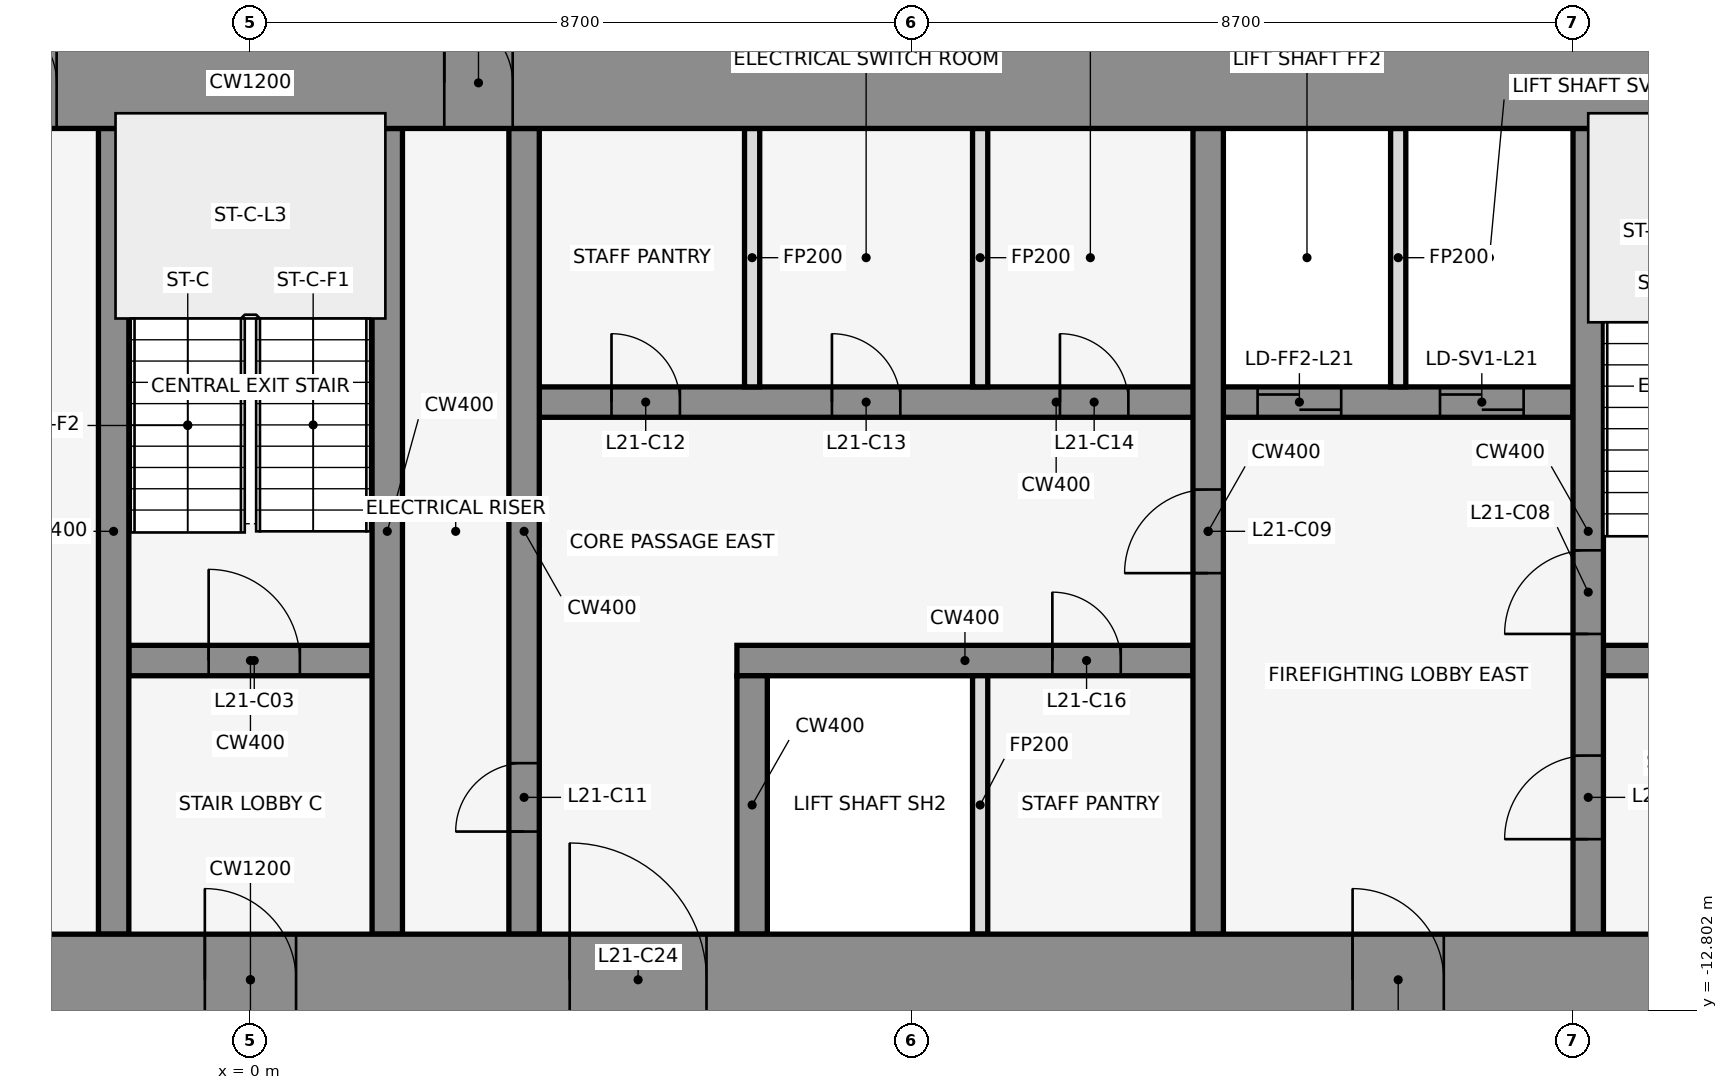
"""IFC4 building model, lengths in metres.
Left out: names, types, materials, properties, quantities, classifications, styles, units other than length and angle.
Written with IfcOpenShell. Run it as: python <this file> out.ifc"""

import sys

from ifc_helpers import new_model, si_unit, direction, frame, frame_2d, origin, place, context, subcontext, project, spatial, rectangle, extrude, element, fill, save


model = new_model("IFC4")
c1 = context("Model", 3, precision=1e-05, world=origin(), true_north=direction((0.0, 1.0)))
c2 = subcontext(c1, "Body", "Model", "MODEL_VIEW")
j1 = project(units=[si_unit("LENGTHUNIT", "METRE"), si_unit("PLANEANGLEUNIT", "RADIAN")], contexts=[c1])
p1 = place(None, origin())
s1 = spatial("IfcSite", under=j1, at=p1, CompositionType="ELEMENT")
p2 = place(p1, origin())
s2 = spatial("IfcBuilding", under=s1, at=p2, CompositionType="ELEMENT")
p3 = place(p2, frame((0.0, 0.0, 102.2)))
s3 = spatial("IfcBuildingStorey", under=s2, at=p3, CompositionType="ELEMENT", Elevation=102.2)
for number, where, z_axis, x_axis in (
    (1, (16.432, -0.105, 0.0), (0.0, 0.0, 1.0), (-0.84, 0.543, 0.0)),
    (2, (1.901, 1.08, 0.0), (0.0, 0.0, 1.0), (-0.84, -0.543, 0.0)),
    (3, (-0.068, -0.105, 0.0), (0.0, 0.0, 1.0), (-0.84, 0.543, 0.0)),
):
    element("IfcWall", number, at=place(p3, frame(where, z_axis=z_axis, x_axis=x_axis)), inside=s3, PredefinedType="STANDARD", context=c2, shape_type="SweptSolid", body=[
        extrude(rectangle(XDim=2.183, YDim=0.25, at=frame_2d((1.091, 0.0))), origin(), (0.0, 0.0, 1.0), 3.95),
    ])
p4 = place(p3, frame((-1.6, -8.2, 0.0), z_axis=(0.0, 0.0, 1.0), x_axis=(1.0, 0.0, 0.0)))
e4 = element("IfcWall", 4, at=p4, inside=s3, PredefinedType="SHEAR", context=c2, shape_type="SweptSolid", body=[
    extrude(rectangle(XDim=3.2, YDim=0.4, at=frame_2d((1.6, 0.0))), origin(), (0.0, 0.0, 1.0), 4.1),
])
p5 = place(p4, frame((1.05, 0.0, 0.0)))
e5 = element("IfcOpeningElement", 5, at=p5, cuts=e4, PredefinedType="OPENING", context=c2, shape_type="SweptSolid", body=[
    extrude(rectangle(XDim=1.2, YDim=2.1, at=frame_2d((0.6, 1.05))), frame((0.0, 0.212, 0.0), z_axis=(0.0, -1.0, 0.0), x_axis=(1.0, 0.0, 0.0)), (0.0, 0.0, 1.0), 0.424),
])
p6 = place(p3, frame((6.4, -8.2, 0.0), z_axis=(0.0, 0.0, 1.0), x_axis=(1.0, 0.0, 0.0)))
e6 = element("IfcWall", 6, at=p6, inside=s3, PredefinedType="SHEAR", context=c2, shape_type="SweptSolid", body=[
    extrude(rectangle(XDim=6.0, YDim=0.4, at=frame_2d((3.0, 0.0))), origin(), (0.0, 0.0, 1.0), 4.1),
])
p7 = place(p6, frame((4.15, 0.0, 0.0)))
e7 = element("IfcOpeningElement", 7, at=p7, cuts=e6, PredefinedType="OPENING", context=c2, shape_type="SweptSolid", body=[
    extrude(rectangle(XDim=0.9, YDim=2.1, at=frame_2d((0.45, 1.05))), frame((0.0, 0.212, 0.0), z_axis=(0.0, -1.0, 0.0), x_axis=(1.0, 0.0, 0.0)), (0.0, 0.0, 1.0), 0.424),
])
p8 = place(p3, frame((17.8, -8.2, 0.0), z_axis=(0.0, 0.0, 1.0), x_axis=(1.0, 0.0, 0.0)))
e8 = element("IfcWall", 8, at=p8, inside=s3, PredefinedType="SHEAR", context=c2, shape_type="SweptSolid", body=[
    extrude(rectangle(XDim=3.0, YDim=0.4, at=frame_2d((1.5, 0.0))), origin(), (0.0, 0.0, 1.0), 4.1),
])
p9 = place(p8, frame((0.85, 0.0, 0.0)))
e9 = element("IfcOpeningElement", 9, at=p9, cuts=e8, PredefinedType="OPENING", context=c2, shape_type="SweptSolid", body=[
    extrude(rectangle(XDim=1.2, YDim=2.1, at=frame_2d((0.6, 1.05))), frame((0.0, 0.212, 0.0), z_axis=(0.0, -1.0, 0.0), x_axis=(1.0, 0.0, 0.0)), (0.0, 0.0, 1.0), 0.424),
])
p10 = place(p3, frame((3.8, -4.8, 0.0), z_axis=(0.0, 0.0, 1.0), x_axis=(1.0, 0.0, 0.0)))
e10 = element("IfcWall", 10, at=p10, inside=s3, PredefinedType="SHEAR", context=c2, shape_type="SweptSolid", body=[
    extrude(rectangle(XDim=13.6, YDim=0.4, at=frame_2d((6.8, 0.0))), origin(), (0.0, 0.0, 1.0), 4.1),
])
p11 = place(p10, frame((9.45, 0.0, 0.0)))
e11 = element("IfcOpeningElement", 11, at=p11, cuts=e10, PredefinedType="OPENING", context=c2, shape_type="SweptSolid", body=[
    extrude(rectangle(XDim=1.1, YDim=2.1, at=frame_2d((0.55, 1.05))), frame((0.0, 0.212, 0.0), z_axis=(0.0, -1.0, 0.0), x_axis=(1.0, 0.0, 0.0)), (0.0, 0.0, 1.0), 0.424),
])
p12 = place(p10, frame((11.85, 0.0, 0.0)))
e12 = element("IfcOpeningElement", 12, at=p12, cuts=e10, PredefinedType="OPENING", context=c2, shape_type="SweptSolid", body=[
    extrude(rectangle(XDim=1.1, YDim=2.1, at=frame_2d((0.55, 1.05))), frame((0.0, 0.212, 0.0), z_axis=(0.0, -1.0, 0.0), x_axis=(1.0, 0.0, 0.0)), (0.0, 0.0, 1.0), 0.424),
])
p13 = place(p10, frame((0.95, 0.0, 0.0)))
e13 = element("IfcOpeningElement", 13, at=p13, cuts=e10, PredefinedType="OPENING", context=c2, shape_type="SweptSolid", body=[
    extrude(rectangle(XDim=0.9, YDim=2.1, at=frame_2d((0.45, 1.05))), frame((0.0, 0.212, 0.0), z_axis=(0.0, -1.0, 0.0), x_axis=(1.0, 0.0, 0.0)), (0.0, 0.0, 1.0), 0.424),
])
p14 = place(p10, frame((3.85, 0.0, 0.0)))
e14 = element("IfcOpeningElement", 14, at=p14, cuts=e10, PredefinedType="OPENING", context=c2, shape_type="SweptSolid", body=[
    extrude(rectangle(XDim=0.9, YDim=2.1, at=frame_2d((0.45, 1.05))), frame((0.0, 0.212, 0.0), z_axis=(0.0, -1.0, 0.0), x_axis=(1.0, 0.0, 0.0)), (0.0, 0.0, 1.0), 0.424),
])
p15 = place(p10, frame((6.85, 0.0, 0.0)))
e15 = element("IfcOpeningElement", 15, at=p15, cuts=e10, PredefinedType="OPENING", context=c2, shape_type="SweptSolid", body=[
    extrude(rectangle(XDim=0.9, YDim=2.1, at=frame_2d((0.45, 1.05))), frame((0.0, 0.212, 0.0), z_axis=(0.0, -1.0, 0.0), x_axis=(1.0, 0.0, 0.0)), (0.0, 0.0, 1.0), 0.424),
])
for number, where, z_axis, x_axis in (
    (16, (-1.8, -11.8, 0.0), (0.0, 0.0, 1.0), (0.0, 1.0, 0.0)),
    (17, (1.8, -11.8, 0.0), (0.0, 0.0, 1.0), (0.0, 1.0, 0.0)),
):
    element("IfcWall", number, at=place(p3, frame(where, z_axis=z_axis, x_axis=x_axis)), inside=s3, PredefinedType="SHEAR", context=c2, shape_type="SweptSolid", body=[
        extrude(rectangle(XDim=10.6, YDim=0.4, at=frame_2d((5.3, 0.0))), origin(), (0.0, 0.0, 1.0), 4.1),
    ])
p16 = place(p3, frame((3.6, -11.8, 0.0), z_axis=(0.0, 0.0, 1.0), x_axis=(0.0, 1.0, 0.0)))
e18 = element("IfcWall", 18, at=p16, inside=s3, PredefinedType="SHEAR", context=c2, shape_type="SweptSolid", body=[
    extrude(rectangle(XDim=10.6, YDim=0.4, at=frame_2d((5.3, 0.0))), origin(), (0.0, 0.0, 1.0), 4.1),
])
p17 = place(p16, frame((1.35, 0.0, 0.0)))
e19 = element("IfcOpeningElement", 19, at=p17, cuts=e18, PredefinedType="OPENING", context=c2, shape_type="SweptSolid", body=[
    extrude(rectangle(XDim=0.9, YDim=2.1, at=frame_2d((0.45, 1.05))), frame((0.0, 0.212, 0.0), z_axis=(0.0, -1.0, 0.0), x_axis=(1.0, 0.0, 0.0)), (0.0, 0.0, 1.0), 0.424),
])
p18 = place(p3, frame((6.6, -11.8, 0.0), z_axis=(0.0, 0.0, 1.0), x_axis=(0.0, 1.0, 0.0)))
e20 = element("IfcWall", 20, at=p18, inside=s3, PredefinedType="SHEAR", context=c2, shape_type="SweptSolid", body=[
    extrude(rectangle(XDim=3.4, YDim=0.4, at=frame_2d((1.7, 0.0))), origin(), (0.0, 0.0, 1.0), 4.1),
])
for number, where, z_axis, x_axis in (
    (21, (6.6, -4.6, 0.0), (0.0, 0.0, 1.0), (0.0, 1.0, 0.0)),
    (22, (9.6, -11.8, 0.0), (0.0, 0.0, 1.0), (0.0, 1.0, 0.0)),
    (23, (9.6, -4.6, 0.0), (0.0, 0.0, 1.0), (0.0, 1.0, 0.0)),
):
    element("IfcWall", number, at=place(p3, frame(where, z_axis=z_axis, x_axis=x_axis)), inside=s3, PredefinedType="PARTITIONING", context=c2, shape_type="SweptSolid", body=[
        extrude(rectangle(XDim=3.4, YDim=0.2, at=frame_2d((1.7, 0.0))), origin(), (0.0, 0.0, 1.0), 3.018),
    ])
p19 = place(p3, frame((12.6, -11.8, 0.0), z_axis=(0.0, 0.0, 1.0), x_axis=(0.0, 1.0, 0.0)))
e24 = element("IfcWall", 24, at=p19, inside=s3, PredefinedType="SHEAR", context=c2, shape_type="SweptSolid", body=[
    extrude(rectangle(XDim=10.6, YDim=0.4, at=frame_2d((5.3, 0.0))), origin(), (0.0, 0.0, 1.0), 4.1),
])
p20 = place(p19, frame((4.75, 0.0, 0.0)))
e25 = element("IfcOpeningElement", 25, at=p20, cuts=e24, PredefinedType="OPENING", context=c2, shape_type="SweptSolid", body=[
    extrude(rectangle(XDim=1.1, YDim=2.1, at=frame_2d((0.55, 1.05))), frame((0.0, 0.212, 0.0), z_axis=(0.0, -1.0, 0.0), x_axis=(1.0, 0.0, 0.0)), (0.0, 0.0, 1.0), 0.424),
])
p21 = place(p3, frame((15.1, -4.6, 0.0), z_axis=(0.0, 0.0, 1.0), x_axis=(0.0, 1.0, 0.0)))
e26 = element("IfcWall", 26, at=p21, inside=s3, PredefinedType="PARTITIONING", context=c2, shape_type="SweptSolid", body=[
    extrude(rectangle(XDim=3.4, YDim=0.2, at=frame_2d((1.7, 0.0))), origin(), (0.0, 0.0, 1.0), 3.018),
])
p22 = place(p3, frame((17.6, -11.8, 0.0), z_axis=(0.0, 0.0, 1.0), x_axis=(0.0, 1.0, 0.0)))
e27 = element("IfcWall", 27, at=p22, inside=s3, PredefinedType="SHEAR", context=c2, shape_type="SweptSolid", body=[
    extrude(rectangle(XDim=10.6, YDim=0.4, at=frame_2d((5.3, 0.0))), origin(), (0.0, 0.0, 1.0), 4.1),
])
p23 = place(p22, frame((1.25, 0.0, 0.0)))
e28 = element("IfcOpeningElement", 28, at=p23, cuts=e27, PredefinedType="OPENING", context=c2, shape_type="SweptSolid", body=[
    extrude(rectangle(XDim=1.1, YDim=2.1, at=frame_2d((0.55, 1.05))), frame((0.0, 0.212, 0.0), z_axis=(0.0, -1.0, 0.0), x_axis=(1.0, 0.0, 0.0)), (0.0, 0.0, 1.0), 0.424),
])
p24 = place(p22, frame((3.95, 0.0, 0.0)))
e29 = element("IfcOpeningElement", 29, at=p24, cuts=e27, PredefinedType="OPENING", context=c2, shape_type="SweptSolid", body=[
    extrude(rectangle(XDim=1.1, YDim=2.1, at=frame_2d((0.55, 1.05))), frame((0.0, 0.212, 0.0), z_axis=(0.0, -1.0, 0.0), x_axis=(1.0, 0.0, 0.0)), (0.0, 0.0, 1.0), 0.424),
])
p25 = place(p3, frame((-22.0, -0.6, 0.0), z_axis=(0.0, 0.0, 1.0), x_axis=(1.0, 0.0, 0.0)))
e30 = element("IfcWall", 30, at=p25, inside=s3, PredefinedType="SHEAR", context=c2, shape_type="SweptSolid", body=[
    extrude(rectangle(XDim=44.0, YDim=1.2, at=frame_2d((22.0, 0.0))), origin(), (0.0, 0.0, 1.0), 4.1),
])
p26 = place(p25, frame((18.55, 0.0, 0.0)))
e31 = element("IfcOpeningElement", 31, at=p26, cuts=e30, PredefinedType="OPENING", context=c2, shape_type="SweptSolid", body=[
    extrude(rectangle(XDim=0.9, YDim=2.1, at=frame_2d((0.45, 1.05))), frame((0.0, 0.612, 0.0), z_axis=(0.0, -1.0, 0.0), x_axis=(1.0, 0.0, 0.0)), (0.0, 0.0, 1.0), 1.224),
])
p27 = place(p25, frame((24.55, 0.0, 0.0)))
e32 = element("IfcOpeningElement", 32, at=p27, cuts=e30, PredefinedType="OPENING", context=c2, shape_type="SweptSolid", body=[
    extrude(rectangle(XDim=0.9, YDim=2.1, at=frame_2d((0.45, 1.05))), frame((0.0, 0.612, 0.0), z_axis=(0.0, -1.0, 0.0), x_axis=(1.0, 0.0, 0.0)), (0.0, 0.0, 1.0), 1.224),
])
p28 = place(p3, frame((-22.0, -12.4, 0.0), z_axis=(0.0, 0.0, 1.0), x_axis=(1.0, 0.0, 0.0)))
e33 = element("IfcWall", 33, at=p28, inside=s3, PredefinedType="SHEAR", context=c2, shape_type="SweptSolid", body=[
    extrude(rectangle(XDim=44.0, YDim=1.2, at=frame_2d((22.0, 0.0))), origin(), (0.0, 0.0, 1.0), 4.1),
])
p29 = place(p28, frame((2.2, 0.0, 0.0)))
e34 = element("IfcOpeningElement", 34, at=p29, cuts=e33, PredefinedType="OPENING", context=c2, shape_type="SweptSolid", body=[
    extrude(rectangle(XDim=1.2, YDim=2.1, at=frame_2d((0.6, 1.05))), frame((0.0, 0.612, 0.0), z_axis=(0.0, -1.0, 0.0), x_axis=(1.0, 0.0, 0.0)), (0.0, 0.0, 1.0), 1.224),
])
p30 = place(p28, frame((21.4, 0.0, 0.0)))
e35 = element("IfcOpeningElement", 35, at=p30, cuts=e33, PredefinedType="OPENING", context=c2, shape_type="SweptSolid", body=[
    extrude(rectangle(XDim=1.2, YDim=2.1, at=frame_2d((0.6, 1.05))), frame((0.0, 0.612, 0.0), z_axis=(0.0, -1.0, 0.0), x_axis=(1.0, 0.0, 0.0)), (0.0, 0.0, 1.0), 1.224),
])
p31 = place(p28, frame((40.6, 0.0, 0.0)))
e36 = element("IfcOpeningElement", 36, at=p31, cuts=e33, PredefinedType="OPENING", context=c2, shape_type="SweptSolid", body=[
    extrude(rectangle(XDim=1.2, YDim=2.1, at=frame_2d((0.6, 1.05))), frame((0.0, 0.612, 0.0), z_axis=(0.0, -1.0, 0.0), x_axis=(1.0, 0.0, 0.0)), (0.0, 0.0, 1.0), 1.224),
])
p32 = place(p28, frame((16.0, 0.0, 0.0)))
e37 = element("IfcOpeningElement", 37, at=p32, cuts=e33, PredefinedType="OPENING", context=c2, shape_type="SweptSolid", body=[
    extrude(rectangle(XDim=1.8, YDim=2.1, at=frame_2d((0.9, 1.05))), frame((0.0, 0.612, 0.0), z_axis=(0.0, -1.0, 0.0), x_axis=(1.0, 0.0, 0.0)), (0.0, 0.0, 1.0), 1.224),
])
p33 = place(p28, frame((6.3, 0.0, 0.0)))
e38 = element("IfcOpeningElement", 38, at=p33, cuts=e33, PredefinedType="OPENING", context=c2, shape_type="SweptSolid", body=[
    extrude(rectangle(XDim=1.2, YDim=2.1, at=frame_2d((0.6, 1.05))), frame((0.0, 0.612, 0.0), z_axis=(0.0, -1.0, 0.0), x_axis=(1.0, 0.0, 0.0)), (0.0, 0.0, 1.0), 1.224),
])
p34 = place(p28, frame((26.2, 0.0, 0.0)))
e39 = element("IfcOpeningElement", 39, at=p34, cuts=e33, PredefinedType="OPENING", context=c2, shape_type="SweptSolid", body=[
    extrude(rectangle(XDim=1.8, YDim=2.1, at=frame_2d((0.9, 1.05))), frame((0.0, 0.612, 0.0), z_axis=(0.0, -1.0, 0.0), x_axis=(1.0, 0.0, 0.0)), (0.0, 0.0, 1.0), 1.224),
])
p35 = place(p28, frame((36.5, 0.0, 0.0)))
e40 = element("IfcOpeningElement", 40, at=p35, cuts=e33, PredefinedType="OPENING", context=c2, shape_type="SweptSolid", body=[
    extrude(rectangle(XDim=1.2, YDim=2.1, at=frame_2d((0.6, 1.05))), frame((0.0, 0.612, 0.0), z_axis=(0.0, -1.0, 0.0), x_axis=(1.0, 0.0, 0.0)), (0.0, 0.0, 1.0), 1.224),
])
p36 = place(p5, origin())
e41 = element("IfcDoor", 41, at=p36, inside=s3, OperationType="SINGLE_SWING_LEFT", PredefinedType="DOOR", context=c2, shape_type="SweptSolid", body=[
    extrude(rectangle(XDim=1.2, YDim=2.1, at=frame_2d((0.6, 1.05))), frame((0.0, 0.025, 0.0), z_axis=(0.0, -1.0, 0.0), x_axis=(1.0, 0.0, 0.0)), (0.0, 0.0, 1.0), 0.05),
])
fill(e5, e41)
p37 = place(p23, origin())
e42 = element("IfcDoor", 42, at=p37, inside=s3, OperationType="SINGLE_SWING_LEFT", PredefinedType="DOOR", context=c2, shape_type="SweptSolid", body=[
    extrude(rectangle(XDim=1.1, YDim=2.1, at=frame_2d((0.55, 1.05))), frame((0.0, 0.025, 0.0), z_axis=(0.0, -1.0, 0.0), x_axis=(1.0, 0.0, 0.0)), (0.0, 0.0, 1.0), 0.05),
])
fill(e28, e42)
p38 = place(p11, origin())
e43 = element("IfcDoor", 43, at=p38, inside=s3, OperationType="DOUBLE_DOOR_SLIDING", PredefinedType="DOOR", context=c2, shape_type="SweptSolid", body=[
    extrude(rectangle(XDim=1.1, YDim=2.1, at=frame_2d((0.55, 1.05))), frame((0.0, 0.025, 0.0), z_axis=(0.0, -1.0, 0.0), x_axis=(1.0, 0.0, 0.0)), (0.0, 0.0, 1.0), 0.05),
])
fill(e11, e43)
p39 = place(p12, origin())
e44 = element("IfcDoor", 44, at=p39, inside=s3, OperationType="DOUBLE_DOOR_SLIDING", PredefinedType="DOOR", context=c2, shape_type="SweptSolid", body=[
    extrude(rectangle(XDim=1.1, YDim=2.1, at=frame_2d((0.55, 1.05))), frame((0.0, 0.025, 0.0), z_axis=(0.0, -1.0, 0.0), x_axis=(1.0, 0.0, 0.0)), (0.0, 0.0, 1.0), 0.05),
])
fill(e12, e44)
p40 = place(p24, origin())
e45 = element("IfcDoor", 45, at=p40, inside=s3, OperationType="SINGLE_SWING_RIGHT", PredefinedType="DOOR", context=c2, shape_type="SweptSolid", body=[
    extrude(rectangle(XDim=1.1, YDim=2.1, at=frame_2d((0.55, 1.05))), frame((0.0, 0.025, 0.0), z_axis=(0.0, -1.0, 0.0), x_axis=(1.0, 0.0, 0.0)), (0.0, 0.0, 1.0), 0.05),
])
fill(e29, e45)
p41 = place(p20, frame((1.1, 0.0, 0.0), z_axis=(0.0, 0.0, 1.0), x_axis=(-1.0, 0.0, 0.0)))
e46 = element("IfcDoor", 46, at=p41, inside=s3, OperationType="SINGLE_SWING_RIGHT", PredefinedType="DOOR", context=c2, shape_type="SweptSolid", body=[
    extrude(rectangle(XDim=1.1, YDim=2.1, at=frame_2d((0.55, 1.05))), frame((0.0, 0.025, 0.0), z_axis=(0.0, -1.0, 0.0), x_axis=(1.0, 0.0, 0.0)), (0.0, 0.0, 1.0), 0.05),
])
fill(e25, e46)
p42 = place(p17, origin())
e47 = element("IfcDoor", 47, at=p42, inside=s3, OperationType="SINGLE_SWING_LEFT", PredefinedType="DOOR", context=c2, shape_type="SweptSolid", body=[
    extrude(rectangle(XDim=0.9, YDim=2.1, at=frame_2d((0.45, 1.05))), frame((0.0, 0.025, 0.0), z_axis=(0.0, -1.0, 0.0), x_axis=(1.0, 0.0, 0.0)), (0.0, 0.0, 1.0), 0.05),
])
fill(e19, e47)
p43 = place(p13, origin())
e48 = element("IfcDoor", 48, at=p43, inside=s3, OperationType="SINGLE_SWING_RIGHT", PredefinedType="DOOR", context=c2, shape_type="SweptSolid", body=[
    extrude(rectangle(XDim=0.9, YDim=2.1, at=frame_2d((0.45, 1.05))), frame((0.0, 0.025, 0.0), z_axis=(0.0, -1.0, 0.0), x_axis=(1.0, 0.0, 0.0)), (0.0, 0.0, 1.0), 0.05),
])
fill(e13, e48)
p44 = place(p14, origin())
e49 = element("IfcDoor", 49, at=p44, inside=s3, OperationType="SINGLE_SWING_LEFT", PredefinedType="DOOR", context=c2, shape_type="SweptSolid", body=[
    extrude(rectangle(XDim=0.9, YDim=2.1, at=frame_2d((0.45, 1.05))), frame((0.0, 0.025, 0.0), z_axis=(0.0, -1.0, 0.0), x_axis=(1.0, 0.0, 0.0)), (0.0, 0.0, 1.0), 0.05),
])
fill(e14, e49)
p45 = place(p15, origin())
e50 = element("IfcDoor", 50, at=p45, inside=s3, OperationType="SINGLE_SWING_RIGHT", PredefinedType="DOOR", context=c2, shape_type="SweptSolid", body=[
    extrude(rectangle(XDim=0.9, YDim=2.1, at=frame_2d((0.45, 1.05))), frame((0.0, 0.025, 0.0), z_axis=(0.0, -1.0, 0.0), x_axis=(1.0, 0.0, 0.0)), (0.0, 0.0, 1.0), 0.05),
])
fill(e15, e50)
p46 = place(p7, frame((0.9, 0.0, 0.0), z_axis=(0.0, 0.0, 1.0), x_axis=(-1.0, 0.0, 0.0)))
e51 = element("IfcDoor", 51, at=p46, inside=s3, OperationType="SINGLE_SWING_LEFT", PredefinedType="DOOR", context=c2, shape_type="SweptSolid", body=[
    extrude(rectangle(XDim=0.9, YDim=2.1, at=frame_2d((0.45, 1.05))), frame((0.0, 0.025, 0.0), z_axis=(0.0, -1.0, 0.0), x_axis=(1.0, 0.0, 0.0)), (0.0, 0.0, 1.0), 0.05),
])
fill(e7, e51)
p47 = place(p26, origin())
e52 = element("IfcDoor", 52, at=p47, inside=s3, OperationType="SINGLE_SWING_LEFT", PredefinedType="DOOR", context=c2, shape_type="SweptSolid", body=[
    extrude(rectangle(XDim=0.9, YDim=2.1, at=frame_2d((0.45, 1.05))), frame((0.0, 0.025, 0.0), z_axis=(0.0, -1.0, 0.0), x_axis=(1.0, 0.0, 0.0)), (0.0, 0.0, 1.0), 0.05),
])
fill(e31, e52)
p48 = place(p27, origin())
e53 = element("IfcDoor", 53, at=p48, inside=s3, OperationType="SINGLE_SWING_LEFT", PredefinedType="DOOR", context=c2, shape_type="SweptSolid", body=[
    extrude(rectangle(XDim=0.9, YDim=2.1, at=frame_2d((0.45, 1.05))), frame((0.0, 0.025, 0.0), z_axis=(0.0, -1.0, 0.0), x_axis=(1.0, 0.0, 0.0)), (0.0, 0.0, 1.0), 0.05),
])
fill(e32, e53)
p49 = place(p30, frame((1.2, 0.0, 0.0), z_axis=(0.0, 0.0, 1.0), x_axis=(-1.0, 0.0, 0.0)))
e54 = element("IfcDoor", 54, at=p49, inside=s3, OperationType="SINGLE_SWING_RIGHT", PredefinedType="DOOR", context=c2, shape_type="SweptSolid", body=[
    extrude(rectangle(XDim=1.2, YDim=2.1, at=frame_2d((0.6, 1.05))), frame((0.0, 0.025, 0.0), z_axis=(0.0, -1.0, 0.0), x_axis=(1.0, 0.0, 0.0)), (0.0, 0.0, 1.0), 0.05),
])
fill(e35, e54)
p50 = place(p34, origin())
e55 = element("IfcDoor", 55, at=p50, inside=s3, OperationType="SINGLE_SWING_LEFT", PredefinedType="DOOR", context=c2, shape_type="SweptSolid", body=[
    extrude(rectangle(XDim=1.8, YDim=2.1, at=frame_2d((0.9, 1.05))), frame((0.0, 0.025, 0.0), z_axis=(0.0, -1.0, 0.0), x_axis=(1.0, 0.0, 0.0)), (0.0, 0.0, 1.0), 0.05),
])
fill(e39, e55)
p51 = place(p35, frame((1.2, 0.0, 0.0), z_axis=(0.0, 0.0, 1.0), x_axis=(-1.0, 0.0, 0.0)))
e56 = element("IfcDoor", 56, at=p51, inside=s3, OperationType="SINGLE_SWING_RIGHT", PredefinedType="DOOR", context=c2, shape_type="SweptSolid", body=[
    extrude(rectangle(XDim=1.2, YDim=2.1, at=frame_2d((0.6, 1.05))), frame((0.0, 0.025, 0.0), z_axis=(0.0, -1.0, 0.0), x_axis=(1.0, 0.0, 0.0)), (0.0, 0.0, 1.0), 0.05),
])
fill(e40, e56)
save(model, sys.argv[1])
